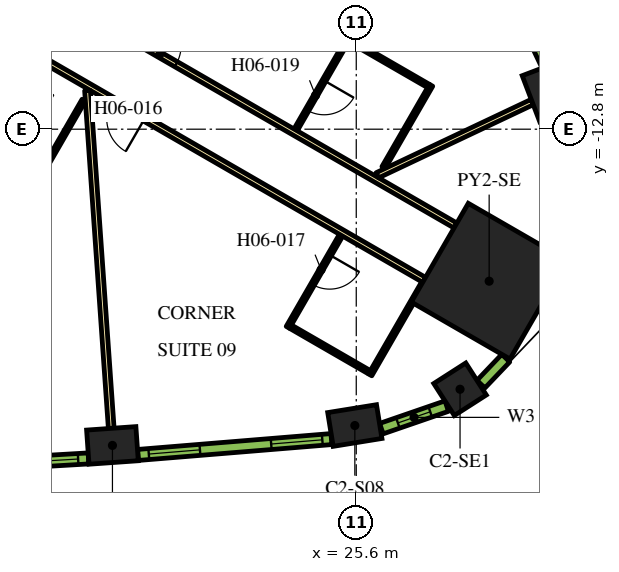
"""IFC4 building model, lengths in metres.
Left out: names, types, materials, properties, quantities, classifications, styles, units other than length and angle.
Written with IfcOpenShell. Run it as: python <this file> out.ifc"""

import sys

from ifc_helpers import new_model, si_unit, direction, frame, frame_2d, origin, origin_2d, place, context, subcontext, project, spatial, rectangle, extrude, element, fill, save


model = new_model("IFC4")
c1 = context("Model", 3, precision=1e-05, world=origin(), true_north=direction((0.0, 1.0)))
c2 = subcontext(c1, "Body", "Model", "MODEL_VIEW")
j1 = project(units=[si_unit("LENGTHUNIT", "METRE"), si_unit("PLANEANGLEUNIT", "RADIAN")], contexts=[c1])
p1 = place(None, origin())
s1 = spatial("IfcSite", under=j1, at=p1, CompositionType="ELEMENT")
p2 = place(p1, origin())
s2 = spatial("IfcBuilding", under=s1, at=p2, CompositionType="ELEMENT")
p3 = place(p2, frame((0.0, 0.0, 91.5)))
s3 = spatial("IfcBuildingStorey", under=s2, at=p3, CompositionType="ELEMENT", Elevation=91.5)
p4 = place(p3, frame((29.097, -16.799, 0.0), z_axis=(0.0, 0.0, 1.0), x_axis=(0.866025403784, -0.5, 0.0)))
e1 = element("IfcColumn", 1, at=p4, inside=s3, PredefinedType="COLUMN", context=c2, shape_type="SweptSolid", body=[
    extrude(rectangle(XDim=3.0, YDim=3.0, at=origin_2d()), origin(), (0.0, 0.0, 1.0), 3.9),
])
for number, where, z_axis, x_axis in (
    (2, (19.184, -21.12, 0.0), (0.0, 0.0, 1.0), (0.998, 0.07, 0.0)),
    (3, (25.563, -20.597, 0.0), (0.0, 0.0, 1.0), (0.987, 0.159, 0.0)),
):
    element("IfcColumn", number, at=place(p3, frame(where, z_axis=z_axis, x_axis=x_axis)), inside=s3, PredefinedType="COLUMN", context=c2, shape_type="SweptSolid", body=[
        extrude(rectangle(XDim=1.3, YDim=0.9, at=origin_2d()), origin(), (0.0, 0.0, 1.0), 3.9),
    ])
p5 = place(p3, frame((28.331, -19.643, 0.0), z_axis=(0.0, 0.0, 1.0), x_axis=(0.841700252504, 0.53994507585, 0.0)))
e4 = element("IfcColumn", 4, at=p5, inside=s3, PredefinedType="COLUMN", context=c2, shape_type="SweptSolid", body=[
    extrude(rectangle(XDim=1.0, YDim=1.0, at=origin_2d()), origin(), (0.0, 0.0, 1.0), 3.9),
])
p6 = place(p3, frame((30.619, -11.839, 0.0), z_axis=(0.0, 0.0, 1.0), x_axis=(-0.355493616145, 0.934678708905, 0.0)))
e5 = element("IfcColumn", 5, at=p6, inside=s3, PredefinedType="COLUMN", context=c2, shape_type="SweptSolid", body=[
    extrude(rectangle(XDim=1.3, YDim=0.9, at=origin_2d()), origin(), (0.0, 0.0, 1.0), 3.9),
])
p7 = place(p3, frame((16.412, -8.523, 0.0), z_axis=(0.0, 0.0, 1.0), x_axis=(0.866025629663, -0.499999608766, 0.0)))
e6 = element("IfcWall", 6, at=p7, inside=s3, PredefinedType="PARTITIONING", context=c2, shape_type="SweptSolid", body=[
    extrude(rectangle(XDim=13.624, YDim=0.15, at=frame_2d((6.812, 0.0))), origin(), (0.0, 0.0, 1.0), 2.75),
])
p8 = place(p7, frame((4.134, 0.0, 0.0)))
e7 = element("IfcOpeningElement", 7, at=p8, cuts=e6, PredefinedType="OPENING", context=c2, shape_type="SweptSolid", body=[
    extrude(rectangle(XDim=1.0, YDim=2.1, at=frame_2d((0.5, 1.05))), frame((0.0, 0.085, 0.0), z_axis=(0.0, -1.0, 0.0), x_axis=(1.0, 0.0, 0.0)), (0.0, 0.0, 1.0), 0.17),
])
p9 = place(p3, frame((27.386, -16.764, 0.0), z_axis=(0.0, 0.0, 1.0), x_axis=(-0.866022585856, 0.500004880763, 0.0)))
e8 = element("IfcWall", 8, at=p9, inside=s3, PredefinedType="PARTITIONING", context=c2, shape_type="SweptSolid", body=[
    extrude(rectangle(XDim=13.544, YDim=0.15, at=frame_2d((6.772, 0.0))), origin(), (0.0, 0.0, 1.0), 2.75),
])
p10 = place(p9, frame((12.214, 0.0, 0.0)))
e9 = element("IfcOpeningElement", 9, at=p10, cuts=e8, PredefinedType="OPENING", context=c2, shape_type="SweptSolid", body=[
    extrude(rectangle(XDim=1.0, YDim=2.1, at=frame_2d((0.5, 1.05))), frame((0.0, 0.085, 0.0), z_axis=(0.0, -1.0, 0.0), x_axis=(1.0, 0.0, 0.0)), (0.0, 0.0, 1.0), 0.17),
])
p11 = place(p9, frame((8.49, 0.0, 0.0)))
e10 = element("IfcOpeningElement", 10, at=p11, cuts=e8, PredefinedType="OPENING", context=c2, shape_type="SweptSolid", body=[
    extrude(rectangle(XDim=1.0, YDim=2.1, at=frame_2d((0.5, 1.05))), frame((0.0, 0.085, 0.0), z_axis=(0.0, -1.0, 0.0), x_axis=(1.0, 0.0, 0.0)), (0.0, 0.0, 1.0), 0.17),
])
p12 = place(p3, frame((19.153, -20.671, 0.0), z_axis=(0.0, 0.0, 1.0), x_axis=(-0.070070736723, 0.997542025107, 0.0)))
e11 = element("IfcWall", 11, at=p12, inside=s3, PredefinedType="PARTITIONING", context=c2, shape_type="SweptSolid", body=[
    extrude(rectangle(XDim=8.909, YDim=0.15, at=frame_2d((4.455, 0.0))), origin(), (0.0, 0.0, 1.0), 2.75),
])
p13 = place(p3, frame((30.231, -12.085, 0.0), z_axis=(0.0, 0.0, 1.0), x_axis=(-0.904001132572, -0.427530060122, 0.0)))
e12 = element("IfcWall", 12, at=p13, inside=s3, PredefinedType="PARTITIONING", context=c2, shape_type="SweptSolid", body=[
    extrude(rectangle(XDim=4.51, YDim=0.15, at=frame_2d((2.255, 0.0))), origin(), (0.0, 0.0, 1.0), 2.75),
])
p14 = place(p3, frame((18.429, -12.037, 0.0), z_axis=(0.0, 0.0, 1.0), x_axis=(-0.500007957085, -0.86602080971, 0.0)))
e13 = element("IfcWall", 13, at=p14, inside=s3, PredefinedType="PARTITIONING", context=c2, shape_type="SweptSolid", body=[
    extrude(rectangle(XDim=2.64, YDim=0.1, at=frame_2d((1.32, 0.0))), origin(), (0.0, 0.0, 1.0), 2.75),
])
p15 = place(p3, frame((25.2, -15.589, 0.0), z_axis=(0.0, 0.0, 1.0), x_axis=(-0.500011755427, -0.866018616679, 0.0)))
e14 = element("IfcWall", 14, at=p15, inside=s3, PredefinedType="PARTITIONING", context=c2, shape_type="SweptSolid", body=[
    extrude(rectangle(XDim=2.8, YDim=0.1, at=frame_2d((1.4, 0.0))), origin(), (0.0, 0.0, 1.0), 2.75),
])
p16 = place(p15, frame((0.6, 0.0, 0.0)))
e15 = element("IfcOpeningElement", 15, at=p16, cuts=e14, PredefinedType="OPENING", context=c2, shape_type="SweptSolid", body=[
    extrude(rectangle(XDim=0.9, YDim=2.1, at=frame_2d((0.45, 1.05))), frame((0.0, 0.06, 0.0), z_axis=(0.0, -1.0, 0.0), x_axis=(1.0, 0.0, 0.0)), (0.0, 0.0, 1.0), 0.12),
])
p17 = place(p3, frame((23.869, -17.995, 0.0), z_axis=(0.0, 0.0, 1.0), x_axis=(0.866050077142, -0.499957262057, 0.0)))
e16 = element("IfcWall", 16, at=p17, inside=s3, PredefinedType="PARTITIONING", context=c2, shape_type="SweptSolid", body=[
    extrude(rectangle(XDim=2.4, YDim=0.1, at=frame_2d((1.2, 0.0))), origin(), (0.0, 0.0, 1.0), 2.75),
])
p18 = place(p3, frame((27.365, -16.839, 0.0), z_axis=(0.0, 0.0, 1.0), x_axis=(-0.49994636267, -0.866056369097, 0.0)))
e17 = element("IfcWall", 17, at=p18, inside=s3, PredefinedType="PARTITIONING", context=c2, shape_type="SweptSolid", body=[
    extrude(rectangle(XDim=2.8, YDim=0.1, at=frame_2d((1.4, 0.0))), origin(), (0.0, 0.0, 1.0), 2.75),
])
p19 = place(p3, frame((25.404, -10.395, 0.0), z_axis=(0.0, 0.0, 1.0), x_axis=(-0.500011755427, -0.866018616679, 0.0)))
e18 = element("IfcWall", 18, at=p19, inside=s3, PredefinedType="PARTITIONING", context=c2, shape_type="SweptSolid", body=[
    extrude(rectangle(XDim=2.8, YDim=0.1, at=frame_2d((1.4, 0.0))), origin(), (0.0, 0.0, 1.0), 2.75),
])
p20 = place(p19, frame((1.3, 0.0, 0.0)))
e19 = element("IfcOpeningElement", 19, at=p20, cuts=e18, PredefinedType="OPENING", context=c2, shape_type="SweptSolid", body=[
    extrude(rectangle(XDim=0.9, YDim=2.1, at=frame_2d((0.45, 1.05))), frame((0.0, 0.06, 0.0), z_axis=(0.0, -1.0, 0.0), x_axis=(1.0, 0.0, 0.0)), (0.0, 0.0, 1.0), 0.12),
])
p21 = place(p3, frame((25.422, -10.463, 0.0), z_axis=(0.0, 0.0, 1.0), x_axis=(0.866024647952, -0.500001309137, 0.0)))
e20 = element("IfcWall", 20, at=p21, inside=s3, PredefinedType="PARTITIONING", context=c2, shape_type="SweptSolid", body=[
    extrude(rectangle(XDim=2.4, YDim=0.1, at=frame_2d((1.2, 0.0))), origin(), (0.0, 0.0, 1.0), 2.75),
])
p22 = place(p3, frame((26.319, -13.81, 0.0), z_axis=(0.0, 0.0, 1.0), x_axis=(0.499961950354, 0.866047370643, 0.0)))
e21 = element("IfcWall", 21, at=p22, inside=s3, PredefinedType="PARTITIONING", context=c2, shape_type="SweptSolid", body=[
    extrude(rectangle(XDim=2.5, YDim=0.1, at=frame_2d((1.25, 0.0))), origin(), (0.0, 0.0, 1.0), 2.75),
])
p23 = place(p3, frame((13.462, -21.761, 0.0), z_axis=(0.0, 0.0, 1.0), x_axis=(0.998290511436, 0.058447025388, 0.0)))
e22 = element("IfcWall", 22, at=p23, inside=s3, PredefinedType="SOLIDWALL", context=c2, shape_type="SweptSolid", body=[
    extrude(rectangle(XDim=5.1, YDim=0.29, at=frame_2d((2.55, 0.0))), origin(), (0.0, 0.0, 1.0), 3.65),
])
p24 = place(p23, frame((0.272, 0.0, 0.9)))
e23 = element("IfcOpeningElement", 23, at=p24, cuts=e22, PredefinedType="OPENING", context=c2, shape_type="SweptSolid", body=[
    extrude(rectangle(XDim=1.35, YDim=2.15, at=frame_2d((0.675, 1.075))), frame((0.0, 0.155, 0.0), z_axis=(0.0, -1.0, 0.0), x_axis=(1.0, 0.0, 0.0)), (0.0, 0.0, 1.0), 0.31),
])
p25 = place(p23, frame((3.478, 0.0, 0.9)))
e24 = element("IfcOpeningElement", 24, at=p25, cuts=e22, PredefinedType="OPENING", context=c2, shape_type="SweptSolid", body=[
    extrude(rectangle(XDim=1.35, YDim=2.15, at=frame_2d((0.675, 1.075))), frame((0.0, 0.155, 0.0), z_axis=(0.0, -1.0, 0.0), x_axis=(1.0, 0.0, 0.0)), (0.0, 0.0, 1.0), 0.31),
])
p26 = place(p3, frame((19.857, -21.371, 0.0), z_axis=(0.0, 0.0, 1.0), x_axis=(0.99665273362, 0.081751627308, 0.0)))
e25 = element("IfcWall", 25, at=p26, inside=s3, PredefinedType="SOLIDWALL", context=c2, shape_type="SweptSolid", body=[
    extrude(rectangle(XDim=5.107, YDim=0.29, at=frame_2d((2.553, 0.0))), origin(), (0.0, 0.0, 1.0), 3.65),
])
p27 = place(p26, frame((0.285, 0.0, 0.9)))
e26 = element("IfcOpeningElement", 26, at=p27, cuts=e25, PredefinedType="OPENING", context=c2, shape_type="SweptSolid", body=[
    extrude(rectangle(XDim=1.35, YDim=2.15, at=frame_2d((0.675, 1.075))), frame((0.0, 0.155, 0.0), z_axis=(0.0, -1.0, 0.0), x_axis=(1.0, 0.0, 0.0)), (0.0, 0.0, 1.0), 0.31),
])
p28 = place(p26, frame((3.516, 0.0, 0.9)))
e27 = element("IfcOpeningElement", 27, at=p28, cuts=e25, PredefinedType="OPENING", context=c2, shape_type="SweptSolid", body=[
    extrude(rectangle(XDim=1.35, YDim=2.15, at=frame_2d((0.675, 1.075))), frame((0.0, 0.155, 0.0), z_axis=(0.0, -1.0, 0.0), x_axis=(1.0, 0.0, 0.0)), (0.0, 0.0, 1.0), 0.31),
])
p29 = place(p3, frame((26.261, -20.679, 0.0), z_axis=(0.0, 0.0, 1.0), x_axis=(0.945385815453, 0.325953462844, 0.0)))
e28 = element("IfcWall", 28, at=p29, inside=s3, PredefinedType="SOLIDWALL", context=c2, shape_type="SweptSolid", body=[
    extrude(rectangle(XDim=1.819, YDim=0.29, at=frame_2d((0.91, 0.0))), origin(), (0.0, 0.0, 1.0), 3.65),
])
p30 = place(p29, frame((0.46, 0.0, 0.9)))
e29 = element("IfcOpeningElement", 29, at=p30, cuts=e28, PredefinedType="OPENING", context=c2, shape_type="SweptSolid", body=[
    extrude(rectangle(XDim=0.9, YDim=2.15, at=frame_2d((0.45, 1.075))), frame((0.0, 0.155, 0.0), z_axis=(0.0, -1.0, 0.0), x_axis=(1.0, 0.0, 0.0)), (0.0, 0.0, 1.0), 0.31),
])
p31 = place(p3, frame((28.88, -19.509, 0.0), z_axis=(0.0, 0.0, 1.0), x_axis=(0.690414427296, 0.723414071319, 0.0)))
e30 = element("IfcWall", 30, at=p31, inside=s3, PredefinedType="SOLIDWALL", context=c2, shape_type="SweptSolid", body=[
    extrude(rectangle(XDim=0.947, YDim=0.29, at=frame_2d((0.474, 0.0))), origin(), (0.0, 0.0, 1.0), 3.65),
])
p32 = place(p3, frame((30.62, -11.127, 0.0), z_axis=(0.0, 0.0, 1.0), x_axis=(-0.427543726596, 0.903994669148, 0.0)))
e31 = element("IfcWall", 31, at=p32, inside=s3, PredefinedType="SOLIDWALL", context=c2, shape_type="SweptSolid", body=[
    extrude(rectangle(XDim=5.107, YDim=0.29, at=frame_2d((2.553, 0.0))), origin(), (0.0, 0.0, 1.0), 3.65),
])
p33 = place(p32, frame((0.24, 0.0, 0.9)))
e32 = element("IfcOpeningElement", 32, at=p33, cuts=e31, PredefinedType="OPENING", context=c2, shape_type="SweptSolid", body=[
    extrude(rectangle(XDim=1.35, YDim=2.15, at=frame_2d((0.675, 1.075))), frame((0.0, 0.155, 0.0), z_axis=(0.0, -1.0, 0.0), x_axis=(1.0, 0.0, 0.0)), (0.0, 0.0, 1.0), 0.31),
])
p34 = place(p32, frame((3.471, 0.0, 0.9)))
e33 = element("IfcOpeningElement", 33, at=p34, cuts=e31, PredefinedType="OPENING", context=c2, shape_type="SweptSolid", body=[
    extrude(rectangle(XDim=1.35, YDim=2.15, at=frame_2d((0.675, 1.075))), frame((0.0, 0.155, 0.0), z_axis=(0.0, -1.0, 0.0), x_axis=(1.0, 0.0, 0.0)), (0.0, 0.0, 1.0), 0.31),
])
p35 = place(p11, origin())
e34 = element("IfcDoor", 34, at=p35, inside=s3, OperationType="SINGLE_SWING_RIGHT", PredefinedType="DOOR", context=c2, shape_type="SweptSolid", body=[
    extrude(rectangle(XDim=1.0, YDim=2.1, at=frame_2d((0.5, 1.05))), frame((0.0, 0.025, 0.0), z_axis=(0.0, -1.0, 0.0), x_axis=(1.0, 0.0, 0.0)), (0.0, 0.0, 1.0), 0.05),
])
fill(e10, e34)
p36 = place(p16, origin())
e35 = element("IfcDoor", 35, at=p36, inside=s3, OperationType="SINGLE_SWING_RIGHT", PredefinedType="DOOR", context=c2, shape_type="SweptSolid", body=[
    extrude(rectangle(XDim=0.9, YDim=2.1, at=frame_2d((0.45, 1.05))), frame((0.0, 0.025, 0.0), z_axis=(0.0, -1.0, 0.0), x_axis=(1.0, 0.0, 0.0)), (0.0, 0.0, 1.0), 0.05),
])
fill(e15, e35)
p37 = place(p8, origin())
e36 = element("IfcDoor", 36, at=p37, inside=s3, OperationType="SINGLE_SWING_LEFT", PredefinedType="DOOR", context=c2, shape_type="SweptSolid", body=[
    extrude(rectangle(XDim=1.0, YDim=2.1, at=frame_2d((0.5, 1.05))), frame((0.0, 0.025, 0.0), z_axis=(0.0, -1.0, 0.0), x_axis=(1.0, 0.0, 0.0)), (0.0, 0.0, 1.0), 0.05),
])
fill(e7, e36)
p38 = place(p20, origin())
e37 = element("IfcDoor", 37, at=p38, inside=s3, OperationType="SINGLE_SWING_LEFT", PredefinedType="DOOR", context=c2, shape_type="SweptSolid", body=[
    extrude(rectangle(XDim=0.9, YDim=2.1, at=frame_2d((0.45, 1.05))), frame((0.0, 0.025, 0.0), z_axis=(0.0, -1.0, 0.0), x_axis=(1.0, 0.0, 0.0)), (0.0, 0.0, 1.0), 0.05),
])
fill(e19, e37)
p39 = place(p25, origin())
e38 = element("IfcWindow", 38, at=p39, inside=s3, PartitioningType="DOUBLE_PANEL_VERTICAL", PredefinedType="WINDOW", context=c2, shape_type="SweptSolid", body=[
    extrude(rectangle(XDim=1.35, YDim=2.15, at=frame_2d((0.675, 1.075))), frame((0.0, 0.015, 0.0), z_axis=(0.0, -1.0, 0.0), x_axis=(1.0, 0.0, 0.0)), (0.0, 0.0, 1.0), 0.06),
])
fill(e24, e38)
p40 = place(p27, origin())
e39 = element("IfcWindow", 39, at=p40, inside=s3, PartitioningType="DOUBLE_PANEL_VERTICAL", PredefinedType="WINDOW", context=c2, shape_type="SweptSolid", body=[
    extrude(rectangle(XDim=1.35, YDim=2.15, at=frame_2d((0.675, 1.075))), frame((0.0, 0.015, 0.0), z_axis=(0.0, -1.0, 0.0), x_axis=(1.0, 0.0, 0.0)), (0.0, 0.0, 1.0), 0.06),
])
fill(e26, e39)
p41 = place(p28, origin())
e40 = element("IfcWindow", 40, at=p41, inside=s3, PartitioningType="DOUBLE_PANEL_VERTICAL", PredefinedType="WINDOW", context=c2, shape_type="SweptSolid", body=[
    extrude(rectangle(XDim=1.35, YDim=2.15, at=frame_2d((0.675, 1.075))), frame((0.0, 0.015, 0.0), z_axis=(0.0, -1.0, 0.0), x_axis=(1.0, 0.0, 0.0)), (0.0, 0.0, 1.0), 0.06),
])
fill(e27, e40)
p42 = place(p30, origin())
e41 = element("IfcWindow", 41, at=p42, inside=s3, PartitioningType="SINGLE_PANEL", PredefinedType="WINDOW", context=c2, shape_type="SweptSolid", body=[
    extrude(rectangle(XDim=0.9, YDim=2.15, at=frame_2d((0.45, 1.075))), frame((0.0, 0.015, 0.0), z_axis=(0.0, -1.0, 0.0), x_axis=(1.0, 0.0, 0.0)), (0.0, 0.0, 1.0), 0.06),
])
fill(e29, e41)
p43 = place(p33, origin())
e42 = element("IfcWindow", 42, at=p43, inside=s3, PartitioningType="DOUBLE_PANEL_VERTICAL", PredefinedType="WINDOW", context=c2, shape_type="SweptSolid", body=[
    extrude(rectangle(XDim=1.35, YDim=2.15, at=frame_2d((0.675, 1.075))), frame((0.0, 0.015, 0.0), z_axis=(0.0, -1.0, 0.0), x_axis=(1.0, 0.0, 0.0)), (0.0, 0.0, 1.0), 0.06),
])
fill(e32, e42)
save(model, sys.argv[1])
